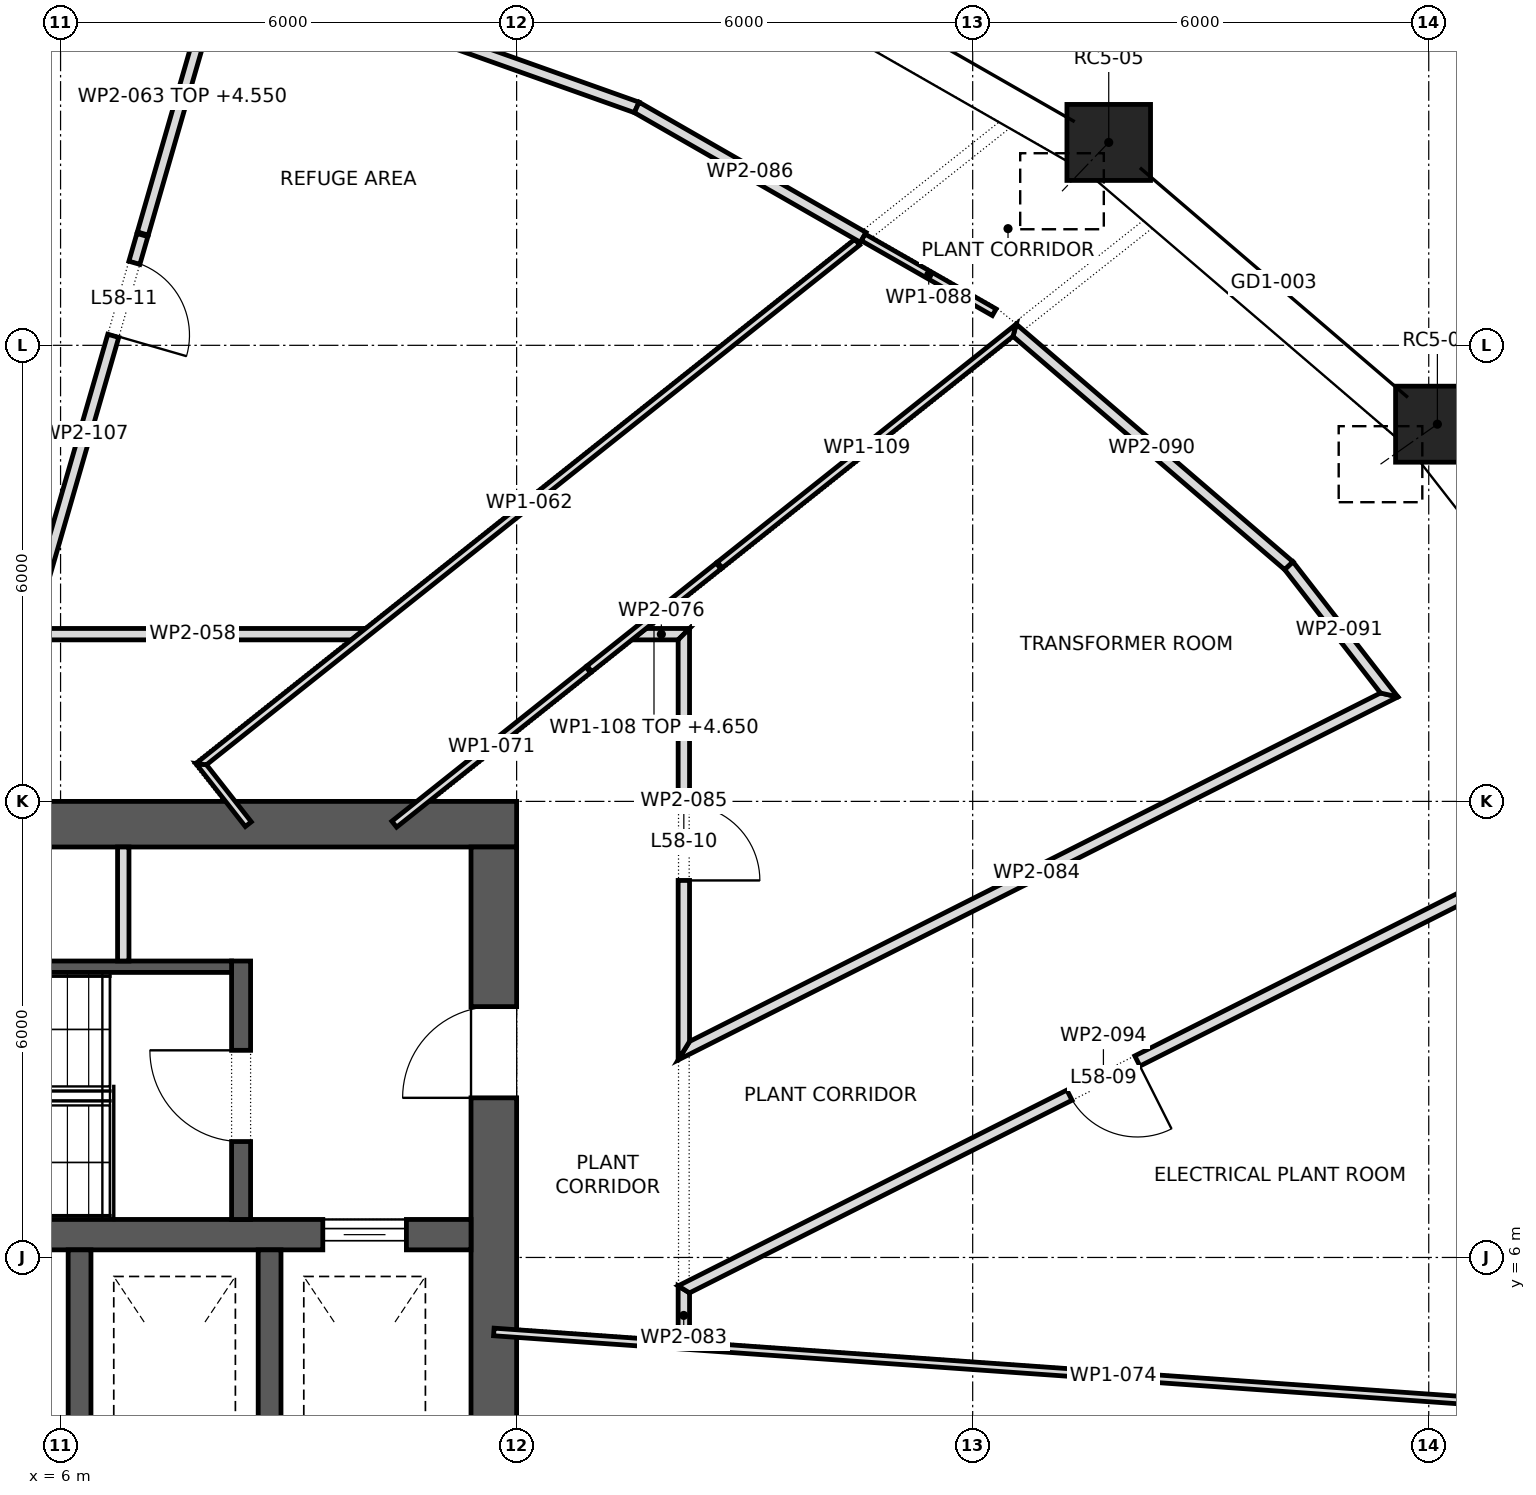
"""IFC4 building model, lengths in metres.
Left out: names, types, materials, properties, quantities, classifications, styles, units other than length and angle.
Written with IfcOpenShell. Run it as: python <this file> out.ifc"""

import sys

from ifc_helpers import new_model, si_unit, direction, frame, frame_2d, origin, origin_2d, place, context, subcontext, project, spatial, polyline, rectangle, outline, extrude, element, fill, save


model = new_model("IFC4")
c1 = context("Model", 3, precision=1e-05, world=origin(), true_north=direction((0.0, 1.0)))
c2 = subcontext(c1, "Body", "Model", "MODEL_VIEW")
j1 = project(units=[si_unit("LENGTHUNIT", "METRE"), si_unit("PLANEANGLEUNIT", "RADIAN")], contexts=[c1])
p1 = place(None, origin())
s1 = spatial("IfcSite", under=j1, at=p1, CompositionType="ELEMENT")
p2 = place(p1, origin())
s2 = spatial("IfcBuilding", under=s1, at=p2, CompositionType="ELEMENT")
p3 = place(p2, frame((0.0, 0.0, 250.9)))
s3 = spatial("IfcBuildingStorey", under=s2, at=p3, CompositionType="ELEMENT", Elevation=250.9)
p4 = place(p3, frame((24.114, 16.962, 0.086), z_axis=(-0.14102688006, -0.099169586892, 0.985026300226), x_axis=(0.575215805529, -0.818001697473, 0.0)))
e1 = element("IfcColumn", 1, at=p4, inside=s3, PredefinedType="COLUMN", context=c2, shape_type="SweptSolid", body=[
    extrude(rectangle(XDim=1.1, YDim=1.0, at=origin_2d()), origin(), (0.0, 0.0, 1.0), 5.308),
])
p5 = place(p3, frame((19.79, 20.669, 0.083), z_axis=(-0.115812481815, -0.12096379157, 0.985877898213), x_axis=(0.722319686129, -0.691559304059, 0.0)))
e2 = element("IfcColumn", 2, at=p5, inside=s3, PredefinedType="COLUMN", context=c2, shape_type="SweptSolid", body=[
    extrude(rectangle(XDim=1.1, YDim=1.0, at=origin_2d()), origin(), (0.0, 0.0, 1.0), 5.308),
])
p6 = place(p3, frame((-12.0, 11.7, 0.0), z_axis=(0.0, 0.0, 1.0), x_axis=(1.0, 0.0, 0.0)))
e3 = element("IfcWall", 3, at=p6, inside=s3, PredefinedType="SHEAR", context=c2, shape_type="SweptSolid", body=[
    extrude(rectangle(XDim=24.0, YDim=0.6, at=frame_2d((12.0, 0.0))), origin(), (0.0, 0.0, 1.0), 5.4),
])
p7 = place(p6, frame((9.4, 0.0, 0.0)))
e4 = element("IfcOpeningElement", 4, at=p7, cuts=e3, PredefinedType="OPENING", context=c2, shape_type="SweptSolid", body=[
    extrude(rectangle(XDim=0.8, YDim=2.1, at=frame_2d((0.4, 1.05))), frame((0.0, 0.312, 0.0), z_axis=(0.0, -1.0, 0.0), x_axis=(1.0, 0.0, 0.0)), (0.0, 0.0, 1.0), 0.624),
])
p8 = place(p6, frame((11.05, 0.0, 0.0)))
e5 = element("IfcOpeningElement", 5, at=p8, cuts=e3, PredefinedType="OPENING", context=c2, shape_type="SweptSolid", body=[
    extrude(rectangle(XDim=0.8, YDim=2.1, at=frame_2d((0.4, 1.05))), frame((0.0, 0.312, 0.0), z_axis=(0.0, -1.0, 0.0), x_axis=(1.0, 0.0, 0.0)), (0.0, 0.0, 1.0), 0.624),
])
p9 = place(p6, frame((4.2, 0.0, 0.0)))
e6 = element("IfcOpeningElement", 6, at=p9, cuts=e3, PredefinedType="OPENING", context=c2, shape_type="SweptSolid", body=[
    extrude(rectangle(XDim=0.8, YDim=2.1, at=frame_2d((0.4, 1.05))), frame((0.0, 0.312, 0.0), z_axis=(0.0, -1.0, 0.0), x_axis=(1.0, 0.0, 0.0)), (0.0, 0.0, 1.0), 0.624),
])
p10 = place(p6, frame((15.85, 0.0, 0.0)))
e7 = element("IfcOpeningElement", 7, at=p10, cuts=e3, PredefinedType="OPENING", context=c2, shape_type="SweptSolid", body=[
    extrude(rectangle(XDim=0.8, YDim=2.1, at=frame_2d((0.4, 1.05))), frame((0.0, 0.312, 0.0), z_axis=(0.0, -1.0, 0.0), x_axis=(1.0, 0.0, 0.0)), (0.0, 0.0, 1.0), 0.624),
])
p11 = place(p3, frame((11.7, -11.4, 0.0), z_axis=(0.0, 0.0, 1.0), x_axis=(0.0, 1.0, 0.0)))
e8 = element("IfcWall", 8, at=p11, inside=s3, PredefinedType="SHEAR", context=c2, shape_type="SweptSolid", body=[
    extrude(rectangle(XDim=22.8, YDim=0.6, at=frame_2d((11.4, 0.0))), origin(), (0.0, 0.0, 1.0), 5.4),
])
p12 = place(p11, frame((10.2, 0.0, 0.0)))
e9 = element("IfcOpeningElement", 9, at=p12, cuts=e8, PredefinedType="OPENING", context=c2, shape_type="SweptSolid", body=[
    extrude(rectangle(XDim=2.4, YDim=2.1, at=frame_2d((1.2, 1.05))), frame((0.0, 0.312, 0.0), z_axis=(0.0, -1.0, 0.0), x_axis=(1.0, 0.0, 0.0)), (0.0, 0.0, 1.0), 0.624),
])
p13 = place(p11, frame((19.5, 0.0, 0.0)))
e10 = element("IfcOpeningElement", 10, at=p13, cuts=e8, PredefinedType="OPENING", context=c2, shape_type="SweptSolid", body=[
    extrude(rectangle(XDim=1.2, YDim=2.1, at=frame_2d((0.6, 1.05))), frame((0.0, 0.312, 0.0), z_axis=(0.0, -1.0, 0.0), x_axis=(1.0, 0.0, 0.0)), (0.0, 0.0, 1.0), 0.624),
])
p14 = place(p11, frame((2.1, 0.0, 0.0)))
e11 = element("IfcOpeningElement", 11, at=p14, cuts=e8, PredefinedType="OPENING", context=c2, shape_type="SweptSolid", body=[
    extrude(rectangle(XDim=1.2, YDim=2.1, at=frame_2d((0.6, 1.05))), frame((0.0, 0.312, 0.0), z_axis=(0.0, -1.0, 0.0), x_axis=(1.0, 0.0, 0.0)), (0.0, 0.0, 1.0), 0.624),
])
p15 = place(p3, frame((-11.4, 6.3, 0.0), z_axis=(0.0, 0.0, 1.0), x_axis=(1.0, 0.0, 0.0)))
e12 = element("IfcWall", 12, at=p15, inside=s3, PredefinedType="SHEAR", context=c2, shape_type="SweptSolid", body=[
    extrude(rectangle(XDim=22.8, YDim=0.4, at=frame_2d((11.4, 0.0))), origin(), (0.0, 0.0, 1.0), 5.4),
])
p16 = place(p15, frame((20.85, 0.0, 0.0)))
e13 = element("IfcOpeningElement", 13, at=p16, cuts=e12, PredefinedType="OPENING", context=c2, shape_type="SweptSolid", body=[
    extrude(rectangle(XDim=1.1, YDim=2.1, at=frame_2d((0.55, 1.05))), frame((0.0, 0.212, 0.0), z_axis=(0.0, -1.0, 0.0), x_axis=(1.0, 0.0, 0.0)), (0.0, 0.0, 1.0), 0.424),
])
for number, where, z_axis, x_axis in (
    (14, (6.25, 3.2, 0.0), (0.0, 0.0, 1.0), (0.0, 1.0, 0.0)),
    (15, (8.75, 3.2, 0.0), (0.0, 0.0, 1.0), (0.0, 1.0, 0.0)),
):
    element("IfcWall", number, at=place(p3, frame(where, z_axis=z_axis, x_axis=x_axis)), inside=s3, PredefinedType="SHEAR", context=c2, shape_type="SweptSolid", body=[
        extrude(rectangle(XDim=2.9, YDim=0.3, at=frame_2d((1.45, 0.0))), origin(), (0.0, 0.0, 1.0), 5.4),
    ])
p17 = place(p3, frame((8.375, 6.5, 0.0), z_axis=(0.0, 0.0, 1.0), x_axis=(0.0, 1.0, 0.0)))
e16 = element("IfcWall", 16, at=p17, inside=s3, PredefinedType="SHEAR", context=c2, shape_type="SweptSolid", body=[
    extrude(rectangle(XDim=3.4, YDim=0.25, at=frame_2d((1.7, 0.0))), origin(), (0.0, 0.0, 1.0), 5.1),
])
p18 = place(p17, frame((1.025, 0.0, 0.0)))
e17 = element("IfcOpeningElement", 17, at=p18, cuts=e16, PredefinedType="OPENING", context=c2, shape_type="SweptSolid", body=[
    extrude(rectangle(XDim=1.2, YDim=2.1, at=frame_2d((0.6, 1.05))), frame((0.0, 0.137, 0.0), z_axis=(0.0, -1.0, 0.0), x_axis=(1.0, 0.0, 0.0)), (0.0, 0.0, 1.0), 0.274),
])
p19 = place(p3, frame((0.25, 9.825, 0.0), z_axis=(0.0, 0.0, 1.0), x_axis=(1.0, 0.0, 0.0)))
e18 = element("IfcWall", 18, at=p19, inside=s3, PredefinedType="SHEAR", context=c2, shape_type="SweptSolid", body=[
    extrude(rectangle(XDim=8.0, YDim=0.15, at=frame_2d((4.0, 0.0))), origin(), (0.0, 0.0, 1.0), 5.1),
])
p20 = place(p3, frame((6.825, 9.9, 0.0), z_axis=(0.0, 0.0, 1.0), x_axis=(0.0, 1.0, 0.0)))
e19 = element("IfcWall", 19, at=p20, inside=s3, PredefinedType="PARTITIONING", context=c2, shape_type="SweptSolid", body=[
    extrude(rectangle(XDim=1.5, YDim=0.15, at=frame_2d((0.75, 0.0))), origin(), (0.0, 0.0, 1.0), 5.1),
])
p21 = place(p3, frame((5.46, 14.2, 0.0), z_axis=(0.0, 0.0, 1.0), x_axis=(1.0, 0.0, 0.0)))
e20 = element("IfcWall", 20, at=p21, inside=s3, PredefinedType="PARTITIONING", context=c2, shape_type="SweptSolid", body=[
    extrude(outline(polyline([(0.0, -0.075), (1.455, -0.075), (2.91, -0.075), (4.365, -0.075), (4.553, 0.075), (3.102, 0.075), (1.651, 0.075), (0.199, 0.075), (0.1, 0.0), (0.0, -0.075)])), origin(), (0.0, 0.0, 1.0), 5.1),
])
p22 = place(p3, frame((7.819, 12.529, 0.0), z_axis=(0.0, 0.0, 1.0), x_axis=(0.617350830979, -0.786687963229, 0.0)))
e21 = element("IfcWall", 21, at=p22, inside=s3, PredefinedType="PARTITIONING", context=c2, shape_type="SweptSolid", body=[
    extrude(outline(polyline([(1.054, 0.05), (0.099, 0.05), (0.0, -0.05), (0.0, -0.05), (1.054, -0.05), (1.054, 0.05)])), origin(), (0.0, 0.0, 1.0), 5.1),
])
p23 = place(p3, frame((7.811, 12.459, 0.0), z_axis=(0.0, 0.0, 1.0), x_axis=(0.782532006264, 0.622610359031, 0.0)))
e22 = element("IfcWall", 22, at=p23, inside=s3, PredefinedType="PARTITIONING", context=c2, shape_type="SweptSolid", body=[
    extrude(outline(polyline([(11.08, 0.05), (9.234, 0.05), (7.387, 0.05), (5.54, 0.05), (3.694, 0.05), (1.847, 0.05), (0.0, 0.05), (0.1, -0.05), (1.93, -0.05), (3.76, -0.05), (5.59, -0.05), (7.42, -0.05), (9.25, -0.05), (11.08, -0.05), (11.08, 0.05)])), origin(), (0.0, 0.0, 1.0), 5.1),
])
p24 = place(p3, frame((8.144, 23.148, 0.0), z_axis=(0.0, 0.0, 1.0), x_axis=(-0.277458764532, -0.96073754688, 0.0)))
e23 = element("IfcWall", 23, at=p24, inside=s3, PredefinedType="PARTITIONING", context=c2, shape_type="SweptSolid", body=[
    extrude(outline(polyline([(3.838, 0.075), (1.999, 0.075), (0.159, 0.075), (0.0, -0.075), (1.919, -0.075), (3.838, -0.075), (3.838, 0.075)])), origin(), (0.0, 0.0, 1.0), 4.55),
])
p25 = place(p3, frame((10.39, 11.7, 0.0), z_axis=(0.0, 0.0, 1.0), x_axis=(0.782322562036, 0.622873509574, 0.0)))
e24 = element("IfcWall", 24, at=p25, inside=s3, PredefinedType="PARTITIONING", context=c2, shape_type="SweptSolid", body=[
    extrude(outline(polyline([(0.0, 0.05), (0.0, -0.05), (1.636, -0.05), (3.272, -0.05), (3.272, 0.05), (1.636, 0.05), (0.0, 0.05)])), origin(), (0.0, 0.0, 1.0), 5.1),
])
p26 = place(p3, frame((11.7, 5.02, 0.0), z_axis=(0.0, 0.0, 1.0), x_axis=(0.997521106379, -0.070367906947, 0.0)))
e25 = element("IfcWall", 25, at=p26, inside=s3, PredefinedType="PARTITIONING", context=c2, shape_type="SweptSolid", body=[
    extrude(rectangle(XDim=16.341, YDim=0.1, at=frame_2d((8.171, 0.0))), origin(), (0.0, 0.0, 1.0), 5.1),
])
p27 = place(p3, frame((13.516, 14.2, 0.0), z_axis=(0.0, 0.0, 1.0), x_axis=(1.0, 0.0, 0.0)))
e26 = element("IfcWall", 26, at=p27, inside=s3, PredefinedType="PARTITIONING", context=c2, shape_type="SweptSolid", body=[
    extrude(outline(polyline([(0.0, -0.075), (0.609, -0.075), (0.759, 0.075), (0.188, 0.075), (0.0, -0.075), (0.0, -0.075)])), origin(), (0.0, 0.0, 1.0), 5.1),
])
p28 = place(p3, frame((13.586, 21.128, 0.0), z_axis=(0.0, 0.0, 1.0), x_axis=(-0.942147093133, 0.335199723897, 0.0)))
e27 = element("IfcWall", 27, at=p28, inside=s3, PredefinedType="PARTITIONING", context=c2, shape_type="SweptSolid", body=[
    extrude(outline(polyline([(5.879, -0.075), (5.879, -0.075), (5.72, 0.075), (3.818, 0.075), (1.916, 0.075), (0.013, 0.075), (0.0, -0.073), (0.0, -0.075), (1.96, -0.075), (3.919, -0.075), (5.879, -0.075)])), origin(), (0.0, 0.0, 1.0), 5.1),
])
p29 = place(p3, frame((14.2, 5.626, 0.0), z_axis=(0.0, 0.0, 1.0), x_axis=(0.0, -1.0, 0.0)))
e28 = element("IfcWall", 28, at=p29, inside=s3, PredefinedType="PARTITIONING", context=c2, shape_type="SweptSolid", body=[
    extrude(outline(polyline([(0.0, -0.075), (0.727, -0.075), (0.738, 0.075), (0.092, 0.075), (0.046, 0.0), (0.0, -0.075)])), origin(), (0.0, 0.0, 1.0), 5.1),
])
p30 = place(p3, frame((14.091, 8.665, 0.0), z_axis=(0.0, 0.0, 1.0), x_axis=(0.892879606884, 0.45029546701, 0.0)))
e29 = element("IfcWall", 29, at=p30, inside=s3, PredefinedType="PARTITIONING", context=c2, shape_type="SweptSolid", body=[
    extrude(outline(polyline([(10.606, -0.075), (10.606, -0.075), (10.424, 0.075), (8.727, 0.075), (7.031, 0.075), (5.334, 0.075), (3.637, 0.075), (1.94, 0.075), (0.243, 0.075), (0.0, -0.075), (0.0, -0.075), (1.768, -0.075), (3.535, -0.075), (5.303, -0.075), (7.071, -0.075), (8.838, -0.075), (10.606, -0.075)])), origin(), (0.0, 0.0, 1.0), 5.1),
])
p31 = place(p3, frame((14.2, 14.275, 0.0), z_axis=(0.0, 0.0, 1.0), x_axis=(0.0, -1.0, 0.0)))
e30 = element("IfcWall", 30, at=p31, inside=s3, PredefinedType="PARTITIONING", context=c2, shape_type="SweptSolid", body=[
    extrude(outline(polyline([(0.15, -0.075), (1.992, -0.075), (3.834, -0.075), (5.677, -0.075), (5.433, 0.075), (3.622, 0.075), (1.811, 0.075), (0.0, 0.075), (0.15, -0.075)])), origin(), (0.0, 0.0, 1.0), 5.1),
])
p32 = place(p31, frame((2.315, 0.0, 0.0)))
e31 = element("IfcOpeningElement", 31, at=p32, cuts=e30, PredefinedType="OPENING", context=c2, shape_type="SweptSolid", body=[
    extrude(rectangle(XDim=1.0, YDim=2.1, at=frame_2d((0.5, 1.05))), frame((0.0, 0.087, 0.0), z_axis=(0.0, -1.0, 0.0), x_axis=(1.0, 0.0, 0.0)), (0.0, 0.0, 1.0), 0.174),
])
p33 = place(p3, frame((16.56, 19.42, 0.0), z_axis=(0.0, 0.0, 1.0), x_axis=(-0.867342678507, 0.497711440536, 0.0)))
e32 = element("IfcWall", 32, at=p33, inside=s3, PredefinedType="PARTITIONING", context=c2, shape_type="SweptSolid", body=[
    extrude(outline(polyline([(0.0, -0.075), (1.721, -0.075), (3.443, -0.075), (3.429, 0.075), (1.715, 0.075), (0.0, 0.075), (0.0, -0.075)])), origin(), (0.0, 0.0, 1.0), 5.1),
])
p34 = place(p3, frame((18.283, 18.435, 0.0), z_axis=(0.0, 0.0, 1.0), x_axis=(-0.868280986798, 0.496072704314, 0.0)))
e33 = element("IfcWall", 33, at=p34, inside=s3, PredefinedType="PARTITIONING", context=c2, shape_type="SweptSolid", body=[
    extrude(rectangle(XDim=1.985, YDim=0.1, at=frame_2d((0.992, 0.0))), origin(), (0.0, 0.0, 1.0), 5.1),
])
p35 = place(p3, frame((22.166, 15.095, 0.0), z_axis=(0.0, 0.0, 1.0), x_axis=(-0.758681846791, 0.651461322989, 0.0)))
e34 = element("IfcWall", 34, at=p35, inside=s3, PredefinedType="PARTITIONING", context=c2, shape_type="SweptSolid", body=[
    extrude(outline(polyline([(4.8, -0.075), (4.8, -0.075), (4.727, 0.075), (3.156, 0.075), (1.586, 0.075), (0.015, 0.075), (0.0, -0.074), (0.0, -0.075), (1.6, -0.075), (3.2, -0.075), (4.8, -0.075)])), origin(), (0.0, 0.0, 1.0), 5.1),
])
p36 = place(p3, frame((22.156, 15.106, 0.0), z_axis=(0.0, 0.0, 1.0), x_axis=(0.613279576322, -0.789865913473, 0.0)))
e35 = element("IfcWall", 35, at=p36, inside=s3, PredefinedType="PARTITIONING", context=c2, shape_type="SweptSolid", body=[
    extrude(outline(polyline([(0.015, -0.075), (2.069, -0.075), (2.251, 0.075), (2.251, 0.075), (0.0, 0.075), (0.0, 0.074), (0.015, -0.075)])), origin(), (0.0, 0.0, 1.0), 5.1),
])
p37 = place(p3, frame((25.308, 11.174, 0.0), z_axis=(0.0, 0.0, 1.0), x_axis=(-0.893124841653, -0.449808867435, 0.0)))
e36 = element("IfcWall", 36, at=p37, inside=s3, PredefinedType="PARTITIONING", context=c2, shape_type="SweptSolid", body=[
    extrude(outline(polyline([(0.0, -0.075), (1.783, -0.075), (3.567, -0.075), (5.35, -0.075), (7.133, -0.075), (8.917, -0.075), (10.7, -0.075), (12.483, -0.075), (12.391, 0.075), (10.643, 0.075), (8.894, 0.075), (7.146, 0.075), (5.398, 0.075), (3.649, 0.075), (1.901, 0.075), (0.153, 0.075), (0.0, -0.075), (0.0, -0.075)])), origin(), (0.0, 0.0, 1.0), 5.1),
])
p38 = place(p37, frame((5.757, 0.0, 0.0)))
e37 = element("IfcOpeningElement", 37, at=p38, cuts=e36, PredefinedType="OPENING", context=c2, shape_type="SweptSolid", body=[
    extrude(rectangle(XDim=1.0, YDim=2.1, at=frame_2d((0.5, 1.05))), frame((0.0, 0.087, 0.0), z_axis=(0.0, -1.0, 0.0), x_axis=(1.0, 0.0, 0.0)), (0.0, 0.0, 1.0), 0.174),
])
p39 = place(p3, frame((7.079, 19.461, 0.0), z_axis=(0.0, 0.0, 1.0), x_axis=(-0.277490255222, -0.960728451883, 0.0)))
e38 = element("IfcWall", 38, at=p39, inside=s3, PredefinedType="PARTITIONING", context=c2, shape_type="SweptSolid", body=[
    extrude(outline(polyline([(5.575, -0.075), (5.575, -0.075), (5.376, 0.075), (3.584, 0.075), (1.792, 0.075), (0.0, 0.075), (0.0, -0.075), (1.858, -0.075), (3.717, -0.075), (5.575, -0.075)])), origin(), (0.0, 0.0, 1.0), 5.1),
])
p40 = place(p39, frame((0.38, 0.0, 0.0)))
e39 = element("IfcOpeningElement", 39, at=p40, cuts=e38, PredefinedType="OPENING", context=c2, shape_type="SweptSolid", body=[
    extrude(rectangle(XDim=1.0, YDim=2.1, at=frame_2d((0.5, 1.05))), frame((0.0, 0.087, 0.0), z_axis=(0.0, -1.0, 0.0), x_axis=(1.0, 0.0, 0.0)), (0.0, 0.0, 1.0), 0.174),
])
p41 = place(p3, frame((12.95, 13.738, 0.0), z_axis=(0.0, 0.0, 1.0), x_axis=(0.782333404853, 0.622859890867, 0.0)))
e40 = element("IfcWall", 40, at=p41, inside=s3, PredefinedType="PARTITIONING", context=c2, shape_type="SweptSolid", body=[
    extrude(outline(polyline([(0.0, 0.05), (0.0, -0.05), (2.192, -0.05), (2.192, 0.05), (0.0, 0.05)])), origin(), (0.0, 0.0, 1.0), 4.65),
])
p42 = place(p3, frame((14.665, 15.104, 0.0), z_axis=(0.0, 0.0, 1.0), x_axis=(0.7823282695, 0.622866340993, 0.0)))
e41 = element("IfcWall", 41, at=p42, inside=s3, PredefinedType="PARTITIONING", context=c2, shape_type="SweptSolid", body=[
    extrude(outline(polyline([(0.0, -0.05), (1.634, -0.05), (3.268, -0.05), (4.902, -0.05), (5.036, 0.05), (3.357, 0.05), (1.678, 0.05), (0.0, 0.05), (0.0, -0.05)])), origin(), (0.0, 0.0, 1.0), 5.1),
])
p43 = place(p16, origin())
e42 = element("IfcDoor", 42, at=p43, inside=s3, OperationType="SLIDING_TO_LEFT", PredefinedType="DOOR", context=c2, shape_type="SweptSolid", body=[
    extrude(rectangle(XDim=1.1, YDim=2.1, at=frame_2d((0.55, 1.05))), frame((0.0, 0.025, 0.0), z_axis=(0.0, -1.0, 0.0), x_axis=(1.0, 0.0, 0.0)), (0.0, 0.0, 1.0), 0.05),
])
fill(e13, e42)
p44 = place(p18, origin())
e43 = element("IfcDoor", 43, at=p44, inside=s3, OperationType="SINGLE_SWING_LEFT", PredefinedType="DOOR", context=c2, shape_type="SweptSolid", body=[
    extrude(rectangle(XDim=1.2, YDim=2.1, at=frame_2d((0.6, 1.05))), frame((0.0, 0.025, 0.0), z_axis=(0.0, -1.0, 0.0), x_axis=(1.0, 0.0, 0.0)), (0.0, 0.0, 1.0), 0.05),
])
fill(e17, e43)
p45 = place(p13, origin())
e44 = element("IfcDoor", 44, at=p45, inside=s3, OperationType="SINGLE_SWING_RIGHT", PredefinedType="DOOR", context=c2, shape_type="SweptSolid", body=[
    extrude(rectangle(XDim=1.2, YDim=2.1, at=frame_2d((0.6, 1.05))), frame((0.0, 0.025, 0.0), z_axis=(0.0, -1.0, 0.0), x_axis=(1.0, 0.0, 0.0)), (0.0, 0.0, 1.0), 0.05),
])
fill(e10, e44)
p46 = place(p38, origin())
e45 = element("IfcDoor", 45, at=p46, inside=s3, OperationType="SINGLE_SWING_RIGHT", PredefinedType="DOOR", context=c2, shape_type="SweptSolid", body=[
    extrude(rectangle(XDim=1.0, YDim=2.1, at=frame_2d((0.5, 1.05))), frame((0.0, 0.025, 0.0), z_axis=(0.0, -1.0, 0.0), x_axis=(1.0, 0.0, 0.0)), (0.0, 0.0, 1.0), 0.05),
])
fill(e37, e45)
p47 = place(p32, origin())
e46 = element("IfcDoor", 46, at=p47, inside=s3, OperationType="SINGLE_SWING_LEFT", PredefinedType="DOOR", context=c2, shape_type="SweptSolid", body=[
    extrude(rectangle(XDim=1.0, YDim=2.1, at=frame_2d((0.5, 1.05))), frame((0.0, 0.025, 0.0), z_axis=(0.0, -1.0, 0.0), x_axis=(1.0, 0.0, 0.0)), (0.0, 0.0, 1.0), 0.05),
])
fill(e31, e46)
p48 = place(p40, origin())
e47 = element("IfcDoor", 47, at=p48, inside=s3, OperationType="SINGLE_SWING_LEFT", PredefinedType="DOOR", context=c2, shape_type="SweptSolid", body=[
    extrude(rectangle(XDim=1.0, YDim=2.1, at=frame_2d((0.5, 1.05))), frame((0.0, 0.025, 0.0), z_axis=(0.0, -1.0, 0.0), x_axis=(1.0, 0.0, 0.0)), (0.0, 0.0, 1.0), 0.05),
])
fill(e39, e47)
save(model, sys.argv[1])
